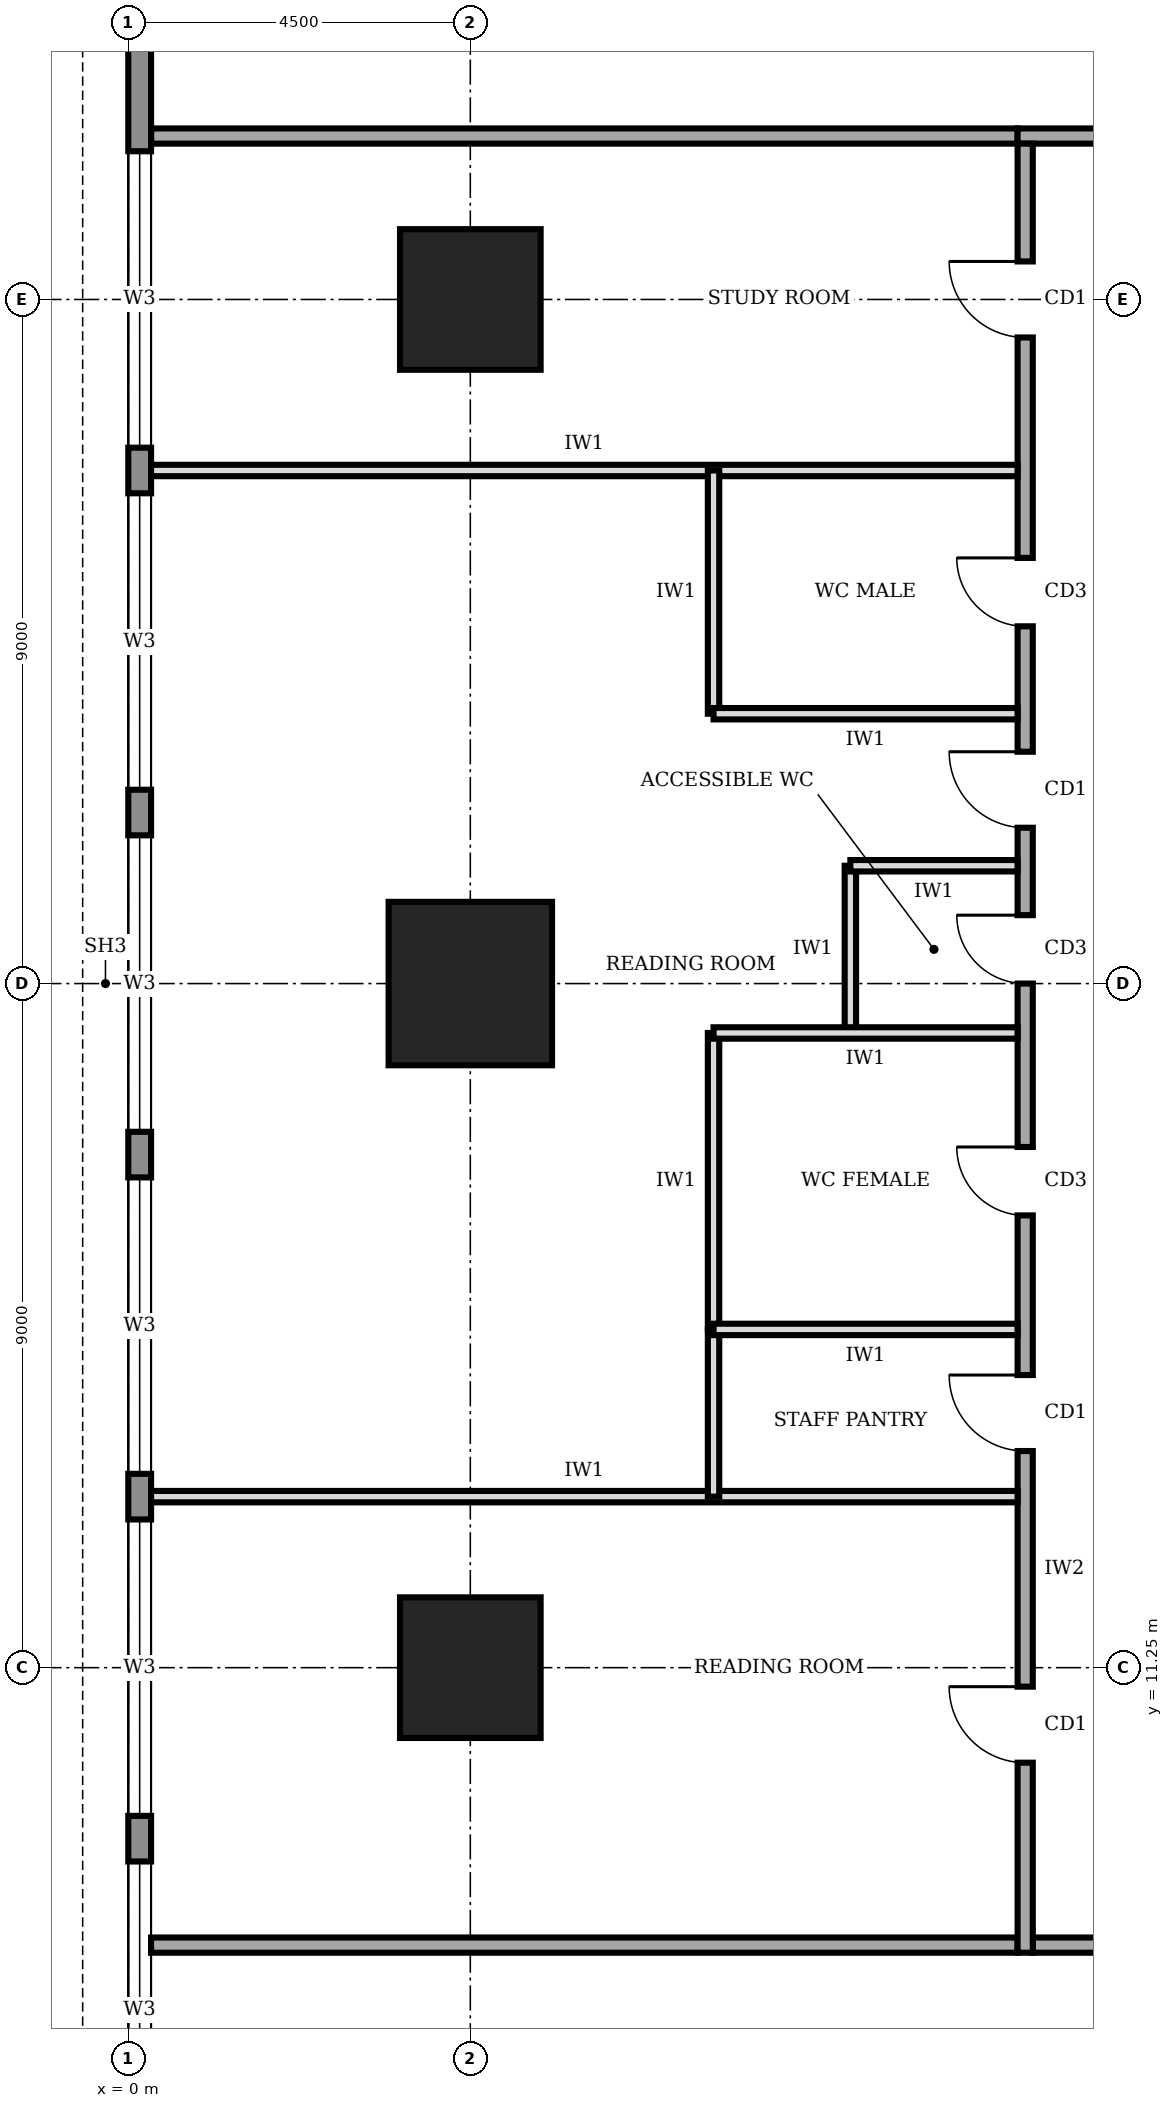
"""IFC4 building model, lengths in metres.
Left out: names, types, materials, properties, quantities, classifications, styles, units other than length and angle.
Written with IfcOpenShell. Run it as: python <this file> out.ifc"""

import sys

from ifc_helpers import new_model, si_unit, direction, frame, frame_2d, origin, origin_2d, place, context, subcontext, project, spatial, rectangle, extrude, element, fill, save


model = new_model("IFC4")
c1 = context("Model", 3, precision=1e-05, world=origin(), true_north=direction((0.0, 1.0)))
c2 = subcontext(c1, "Body", "Model", "MODEL_VIEW")
j1 = project(units=[si_unit("LENGTHUNIT", "METRE"), si_unit("PLANEANGLEUNIT", "RADIAN")], contexts=[c1])
p1 = place(None, origin())
s1 = spatial("IfcSite", under=j1, at=p1, CompositionType="ELEMENT")
p2 = place(p1, origin())
s2 = spatial("IfcBuilding", under=s1, at=p2, CompositionType="ELEMENT")
p3 = place(p2, frame((0.0, 0.0, 265.0)))
s3 = spatial("IfcBuildingStorey", under=s2, at=p3, CompositionType="ELEMENT", Elevation=265.0)
p4 = place(p3, frame((4.5, 11.25, 0.0), z_axis=(0.0, 0.0, 1.0), x_axis=(1.0, 0.0, 0.0)))
e1 = element("IfcColumn", 1, at=p4, inside=s3, PredefinedType="COLUMN", context=c2, shape_type="SweptSolid", body=[
    extrude(rectangle(XDim=1.85, YDim=1.85, at=origin_2d()), origin(), (0.0, 0.0, 1.0), 4.0),
])
p5 = place(p3, frame((4.5, 20.25, 0.0), z_axis=(0.0, 0.0, 1.0), x_axis=(1.0, 0.0, 0.0)))
e2 = element("IfcColumn", 2, at=p5, inside=s3, PredefinedType="COLUMN", context=c2, shape_type="SweptSolid", body=[
    extrude(rectangle(XDim=2.15, YDim=2.15, at=origin_2d()), origin(), (0.0, 0.0, 1.0), 4.0),
])
p6 = place(p3, frame((4.5, 29.25, 0.0), z_axis=(0.0, 0.0, 1.0), x_axis=(1.0, 0.0, 0.0)))
e3 = element("IfcColumn", 3, at=p6, inside=s3, PredefinedType="COLUMN", context=c2, shape_type="SweptSolid", body=[
    extrude(rectangle(XDim=1.85, YDim=1.85, at=origin_2d()), origin(), (0.0, 0.0, 1.0), 4.0),
])
p7 = place(p3, frame((0.15, 35.98, 0.0), z_axis=(0.0, 0.0, 1.0), x_axis=(0.0, -1.0, 0.0)))
e4 = element("IfcWall", 4, at=p7, inside=s3, PredefinedType="STANDARD", context=c2, shape_type="SweptSolid", body=[
    extrude(rectangle(XDim=31.46, YDim=0.3, at=frame_2d((15.73, 0.0))), origin(), (0.0, 0.0, 1.0), 3.75),
])
p8 = place(p7, frame((27.28, 0.0, 0.95)))
e5 = element("IfcOpeningElement", 5, at=p8, cuts=e4, PredefinedType="OPENING", context=c2, shape_type="SweptSolid", body=[
    extrude(rectangle(XDim=3.9, YDim=1.8, at=frame_2d((1.95, 0.9))), frame((0.0, 0.16, 0.0), z_axis=(0.0, -1.0, 0.0), x_axis=(1.0, 0.0, 0.0)), (0.0, 0.0, 1.0), 0.32),
])
p9 = place(p7, frame((22.78, 0.0, 0.95)))
e6 = element("IfcOpeningElement", 6, at=p9, cuts=e4, PredefinedType="OPENING", context=c2, shape_type="SweptSolid", body=[
    extrude(rectangle(XDim=3.9, YDim=1.8, at=frame_2d((1.95, 0.9))), frame((0.0, 0.16, 0.0), z_axis=(0.0, -1.0, 0.0), x_axis=(1.0, 0.0, 0.0)), (0.0, 0.0, 1.0), 0.32),
])
p10 = place(p7, frame((18.28, 0.0, 0.95)))
e7 = element("IfcOpeningElement", 7, at=p10, cuts=e4, PredefinedType="OPENING", context=c2, shape_type="SweptSolid", body=[
    extrude(rectangle(XDim=3.9, YDim=1.8, at=frame_2d((1.95, 0.9))), frame((0.0, 0.16, 0.0), z_axis=(0.0, -1.0, 0.0), x_axis=(1.0, 0.0, 0.0)), (0.0, 0.0, 1.0), 0.32),
])
p11 = place(p7, frame((13.78, 0.0, 0.95)))
e8 = element("IfcOpeningElement", 8, at=p11, cuts=e4, PredefinedType="OPENING", context=c2, shape_type="SweptSolid", body=[
    extrude(rectangle(XDim=3.9, YDim=1.8, at=frame_2d((1.95, 0.9))), frame((0.0, 0.16, 0.0), z_axis=(0.0, -1.0, 0.0), x_axis=(1.0, 0.0, 0.0)), (0.0, 0.0, 1.0), 0.32),
])
p12 = place(p7, frame((9.28, 0.0, 0.95)))
e9 = element("IfcOpeningElement", 9, at=p12, cuts=e4, PredefinedType="OPENING", context=c2, shape_type="SweptSolid", body=[
    extrude(rectangle(XDim=3.9, YDim=1.8, at=frame_2d((1.95, 0.9))), frame((0.0, 0.16, 0.0), z_axis=(0.0, -1.0, 0.0), x_axis=(1.0, 0.0, 0.0)), (0.0, 0.0, 1.0), 0.32),
])
p13 = place(p7, frame((4.78, 0.0, 0.95)))
e10 = element("IfcOpeningElement", 10, at=p13, cuts=e4, PredefinedType="OPENING", context=c2, shape_type="SweptSolid", body=[
    extrude(rectangle(XDim=3.9, YDim=1.8, at=frame_2d((1.95, 0.9))), frame((0.0, 0.16, 0.0), z_axis=(0.0, -1.0, 0.0), x_axis=(1.0, 0.0, 0.0)), (0.0, 0.0, 1.0), 0.32),
])
p14 = place(p3, frame((11.9, 7.6, 0.0), z_axis=(0.0, 0.0, 1.0), x_axis=(1.0, 0.0, 0.0)))
e11 = element("IfcWall", 11, at=p14, inside=s3, PredefinedType="SOLIDWALL", context=c2, shape_type="SweptSolid", body=[
    extrude(rectangle(XDim=16.9, YDim=0.2, at=frame_2d((8.45, 0.0))), origin(), (0.0, 0.0, 1.0), 3.75),
])
p15 = place(p14, frame((4.5, 0.0, 0.0)))
e12 = element("IfcOpeningElement", 12, at=p15, cuts=e11, PredefinedType="OPENING", context=c2, shape_type="SweptSolid", body=[
    extrude(rectangle(XDim=1.4, YDim=2.1, at=frame_2d((0.7, 1.05))), frame((0.0, 0.11, 0.0), z_axis=(0.0, -1.0, 0.0), x_axis=(1.0, 0.0, 0.0)), (0.0, 0.0, 1.0), 0.22),
])
p16 = place(p14, frame((12.85, 0.0, 0.0)))
e13 = element("IfcOpeningElement", 13, at=p16, cuts=e11, PredefinedType="OPENING", context=c2, shape_type="SweptSolid", body=[
    extrude(rectangle(XDim=1.8, YDim=2.1, at=frame_2d((0.9, 1.05))), frame((0.0, 0.11, 0.0), z_axis=(0.0, -1.0, 0.0), x_axis=(1.0, 0.0, 0.0)), (0.0, 0.0, 1.0), 0.22),
])
p17 = place(p3, frame((28.6, 31.4, 0.0), z_axis=(0.0, 0.0, 1.0), x_axis=(-1.0, 0.0, 0.0)))
e14 = element("IfcWall", 14, at=p17, inside=s3, PredefinedType="SOLIDWALL", context=c2, shape_type="SweptSolid", body=[
    extrude(rectangle(XDim=16.9, YDim=0.2, at=frame_2d((8.45, 0.0))), origin(), (0.0, 0.0, 1.0), 3.75),
])
p18 = place(p17, frame((13.05, 0.0, 0.0)))
e15 = element("IfcOpeningElement", 15, at=p18, cuts=e14, PredefinedType="OPENING", context=c2, shape_type="SweptSolid", body=[
    extrude(rectangle(XDim=1.4, YDim=2.1, at=frame_2d((0.7, 1.05))), frame((0.0, 0.11, 0.0), z_axis=(0.0, -1.0, 0.0), x_axis=(1.0, 0.0, 0.0)), (0.0, 0.0, 1.0), 0.22),
])
p19 = place(p17, frame((5.6, 0.0, 0.0)))
e16 = element("IfcOpeningElement", 16, at=p19, cuts=e14, PredefinedType="OPENING", context=c2, shape_type="SweptSolid", body=[
    extrude(rectangle(XDim=1.0, YDim=2.1, at=frame_2d((0.5, 1.05))), frame((0.0, 0.11, 0.0), z_axis=(0.0, -1.0, 0.0), x_axis=(1.0, 0.0, 0.0)), (0.0, 0.0, 1.0), 0.22),
])
p20 = place(p17, frame((0.275, 0.0, 0.0)))
e17 = element("IfcOpeningElement", 17, at=p20, cuts=e14, PredefinedType="OPENING", context=c2, shape_type="SweptSolid", body=[
    extrude(rectangle(XDim=1.0, YDim=2.1, at=frame_2d((0.5, 1.05))), frame((0.0, 0.11, 0.0), z_axis=(0.0, -1.0, 0.0), x_axis=(1.0, 0.0, 0.0)), (0.0, 0.0, 1.0), 0.22),
])
p21 = place(p3, frame((11.8, 31.3, 0.0), z_axis=(0.0, 0.0, 1.0), x_axis=(0.0, -1.0, 0.0)))
e18 = element("IfcWall", 18, at=p21, inside=s3, PredefinedType="SOLIDWALL", context=c2, shape_type="SweptSolid", body=[
    extrude(rectangle(XDim=23.8, YDim=0.2, at=frame_2d((11.9, 0.0))), origin(), (0.0, 0.0, 1.0), 3.75),
])
p22 = place(p21, frame((20.3, 0.0, 0.0)))
e19 = element("IfcOpeningElement", 19, at=p22, cuts=e18, PredefinedType="OPENING", context=c2, shape_type="SweptSolid", body=[
    extrude(rectangle(XDim=1.0, YDim=2.1, at=frame_2d((0.5, 1.05))), frame((0.0, 0.11, 0.0), z_axis=(0.0, -1.0, 0.0), x_axis=(1.0, 0.0, 0.0)), (0.0, 0.0, 1.0), 0.22),
])
p23 = place(p21, frame((16.2, 0.0, 0.0)))
e20 = element("IfcOpeningElement", 20, at=p23, cuts=e18, PredefinedType="OPENING", context=c2, shape_type="SweptSolid", body=[
    extrude(rectangle(XDim=1.0, YDim=2.1, at=frame_2d((0.5, 1.05))), frame((0.0, 0.11, 0.0), z_axis=(0.0, -1.0, 0.0), x_axis=(1.0, 0.0, 0.0)), (0.0, 0.0, 1.0), 0.22),
])
p24 = place(p21, frame((13.2, 0.0, 0.0)))
e21 = element("IfcOpeningElement", 21, at=p24, cuts=e18, PredefinedType="OPENING", context=c2, shape_type="SweptSolid", body=[
    extrude(rectangle(XDim=0.9, YDim=2.1, at=frame_2d((0.45, 1.05))), frame((0.0, 0.11, 0.0), z_axis=(0.0, -1.0, 0.0), x_axis=(1.0, 0.0, 0.0)), (0.0, 0.0, 1.0), 0.22),
])
p25 = place(p21, frame((10.15, 0.0, 0.0)))
e22 = element("IfcOpeningElement", 22, at=p25, cuts=e18, PredefinedType="OPENING", context=c2, shape_type="SweptSolid", body=[
    extrude(rectangle(XDim=0.9, YDim=2.1, at=frame_2d((0.45, 1.05))), frame((0.0, 0.11, 0.0), z_axis=(0.0, -1.0, 0.0), x_axis=(1.0, 0.0, 0.0)), (0.0, 0.0, 1.0), 0.22),
])
p26 = place(p21, frame((5.45, 0.0, 0.0)))
e23 = element("IfcOpeningElement", 23, at=p26, cuts=e18, PredefinedType="OPENING", context=c2, shape_type="SweptSolid", body=[
    extrude(rectangle(XDim=0.9, YDim=2.1, at=frame_2d((0.45, 1.05))), frame((0.0, 0.11, 0.0), z_axis=(0.0, -1.0, 0.0), x_axis=(1.0, 0.0, 0.0)), (0.0, 0.0, 1.0), 0.22),
])
p27 = place(p21, frame((8.0, 0.0, 0.0)))
e24 = element("IfcOpeningElement", 24, at=p27, cuts=e18, PredefinedType="OPENING", context=c2, shape_type="SweptSolid", body=[
    extrude(rectangle(XDim=1.0, YDim=2.1, at=frame_2d((0.5, 1.05))), frame((0.0, 0.11, 0.0), z_axis=(0.0, -1.0, 0.0), x_axis=(1.0, 0.0, 0.0)), (0.0, 0.0, 1.0), 0.22),
])
p28 = place(p21, frame((1.55, 0.0, 0.0)))
e25 = element("IfcOpeningElement", 25, at=p28, cuts=e18, PredefinedType="OPENING", context=c2, shape_type="SweptSolid", body=[
    extrude(rectangle(XDim=1.0, YDim=2.1, at=frame_2d((0.5, 1.05))), frame((0.0, 0.11, 0.0), z_axis=(0.0, -1.0, 0.0), x_axis=(1.0, 0.0, 0.0)), (0.0, 0.0, 1.0), 0.22),
])
for number, where, z_axis, x_axis in (
    (26, (0.3, 7.6, 0.0), (0.0, 0.0, 1.0), (1.0, 0.0, 0.0)),
    (27, (0.3, 31.4, 0.0), (0.0, 0.0, 1.0), (1.0, 0.0, 0.0)),
):
    element("IfcWall", number, at=place(p3, frame(where, z_axis=z_axis, x_axis=x_axis)), inside=s3, PredefinedType="SOLIDWALL", context=c2, shape_type="SweptSolid", body=[
        extrude(rectangle(XDim=11.4, YDim=0.2, at=frame_2d((5.7, 0.0))), origin(), (0.0, 0.0, 1.0), 3.75),
    ])
for number, where, z_axis, x_axis in (
    (28, (0.3, 13.5, 0.0), (0.0, 0.0, 1.0), (1.0, 0.0, 0.0)),
    (29, (0.3, 27.0, 0.0), (0.0, 0.0, 1.0), (1.0, 0.0, 0.0)),
):
    element("IfcWall", number, at=place(p3, frame(where, z_axis=z_axis, x_axis=x_axis)), inside=s3, PredefinedType="PARTITIONING", context=c2, shape_type="SweptSolid", body=[
        extrude(rectangle(XDim=11.4, YDim=0.15, at=frame_2d((5.7, 0.0))), origin(), (0.0, 0.0, 1.0), 3.75),
    ])
p29 = place(p3, frame((11.7, 15.7, 0.0), z_axis=(0.0, 0.0, 1.0), x_axis=(-1.0, 0.0, 0.0)))
e30 = element("IfcWall", 30, at=p29, inside=s3, PredefinedType="PARTITIONING", context=c2, shape_type="SweptSolid", body=[
    extrude(rectangle(XDim=4.0, YDim=0.15, at=frame_2d((2.0, 0.0))), origin(), (0.0, 0.0, 1.0), 3.75),
])
p30 = place(p3, frame((11.7, 19.6, 0.0), z_axis=(0.0, 0.0, 1.0), x_axis=(-1.0, 0.0, 0.0)))
e31 = element("IfcWall", 31, at=p30, inside=s3, PredefinedType="PARTITIONING", context=c2, shape_type="SweptSolid", body=[
    extrude(rectangle(XDim=4.0, YDim=0.15, at=frame_2d((2.0, 0.0))), origin(), (0.0, 0.0, 1.0), 2.85),
])
p31 = place(p3, frame((11.7, 21.8, 0.0), z_axis=(0.0, 0.0, 1.0), x_axis=(-1.0, 0.0, 0.0)))
e32 = element("IfcWall", 32, at=p31, inside=s3, PredefinedType="PARTITIONING", context=c2, shape_type="SweptSolid", body=[
    extrude(rectangle(XDim=2.2, YDim=0.15, at=frame_2d((1.1, 0.0))), origin(), (0.0, 0.0, 1.0), 3.75),
])
p32 = place(p3, frame((11.7, 23.8, 0.0), z_axis=(0.0, 0.0, 1.0), x_axis=(-1.0, 0.0, 0.0)))
e33 = element("IfcWall", 33, at=p32, inside=s3, PredefinedType="PARTITIONING", context=c2, shape_type="SweptSolid", body=[
    extrude(rectangle(XDim=4.0, YDim=0.15, at=frame_2d((2.0, 0.0))), origin(), (0.0, 0.0, 1.0), 3.75),
])
p33 = place(p3, frame((7.7, 13.5, 0.0), z_axis=(0.0, 0.0, 1.0), x_axis=(0.0, 1.0, 0.0)))
e34 = element("IfcWall", 34, at=p33, inside=s3, PredefinedType="PARTITIONING", context=c2, shape_type="SweptSolid", body=[
    extrude(rectangle(XDim=2.2, YDim=0.15, at=frame_2d((1.1, 0.0))), origin(), (0.0, 0.0, 1.0), 3.75),
])
p34 = place(p3, frame((7.7, 15.7, 0.0), z_axis=(0.0, 0.0, 1.0), x_axis=(0.0, 1.0, 0.0)))
e35 = element("IfcWall", 35, at=p34, inside=s3, PredefinedType="PARTITIONING", context=c2, shape_type="SweptSolid", body=[
    extrude(rectangle(XDim=3.9, YDim=0.15, at=frame_2d((1.95, 0.0))), origin(), (0.0, 0.0, 1.0), 3.75),
])
p35 = place(p3, frame((9.5, 19.6, 0.0), z_axis=(0.0, 0.0, 1.0), x_axis=(0.0, 1.0, 0.0)))
e36 = element("IfcWall", 36, at=p35, inside=s3, PredefinedType="PARTITIONING", context=c2, shape_type="SweptSolid", body=[
    extrude(rectangle(XDim=2.2, YDim=0.15, at=frame_2d((1.1, 0.0))), origin(), (0.0, 0.0, 1.0), 3.75),
])
p36 = place(p3, frame((7.7, 23.8, 0.0), z_axis=(0.0, 0.0, 1.0), x_axis=(0.0, 1.0, 0.0)))
e37 = element("IfcWall", 37, at=p36, inside=s3, PredefinedType="PARTITIONING", context=c2, shape_type="SweptSolid", body=[
    extrude(rectangle(XDim=3.2, YDim=0.15, at=frame_2d((1.6, 0.0))), origin(), (0.0, 0.0, 1.0), 3.75),
])
p37 = place(p8, origin())
e38 = element("IfcWindow", 38, at=p37, inside=s3, PartitioningType="SINGLE_PANEL", PredefinedType="WINDOW", context=c2, shape_type="SweptSolid", body=[
    extrude(rectangle(XDim=3.9, YDim=1.8, at=frame_2d((1.95, 0.9))), frame((0.0, 0.03, 0.0), z_axis=(0.0, -1.0, 0.0), x_axis=(1.0, 0.0, 0.0)), (0.0, 0.0, 1.0), 0.06),
])
fill(e5, e38)
p38 = place(p9, origin())
e39 = element("IfcWindow", 39, at=p38, inside=s3, PartitioningType="SINGLE_PANEL", PredefinedType="WINDOW", context=c2, shape_type="SweptSolid", body=[
    extrude(rectangle(XDim=3.9, YDim=1.8, at=frame_2d((1.95, 0.9))), frame((0.0, 0.03, 0.0), z_axis=(0.0, -1.0, 0.0), x_axis=(1.0, 0.0, 0.0)), (0.0, 0.0, 1.0), 0.06),
])
fill(e6, e39)
p39 = place(p10, origin())
e40 = element("IfcWindow", 40, at=p39, inside=s3, PartitioningType="SINGLE_PANEL", PredefinedType="WINDOW", context=c2, shape_type="SweptSolid", body=[
    extrude(rectangle(XDim=3.9, YDim=1.8, at=frame_2d((1.95, 0.9))), frame((0.0, 0.03, 0.0), z_axis=(0.0, -1.0, 0.0), x_axis=(1.0, 0.0, 0.0)), (0.0, 0.0, 1.0), 0.06),
])
fill(e7, e40)
p40 = place(p11, origin())
e41 = element("IfcWindow", 41, at=p40, inside=s3, PartitioningType="SINGLE_PANEL", PredefinedType="WINDOW", context=c2, shape_type="SweptSolid", body=[
    extrude(rectangle(XDim=3.9, YDim=1.8, at=frame_2d((1.95, 0.9))), frame((0.0, 0.03, 0.0), z_axis=(0.0, -1.0, 0.0), x_axis=(1.0, 0.0, 0.0)), (0.0, 0.0, 1.0), 0.06),
])
fill(e8, e41)
p41 = place(p12, origin())
e42 = element("IfcWindow", 42, at=p41, inside=s3, PartitioningType="SINGLE_PANEL", PredefinedType="WINDOW", context=c2, shape_type="SweptSolid", body=[
    extrude(rectangle(XDim=3.9, YDim=1.8, at=frame_2d((1.95, 0.9))), frame((0.0, 0.03, 0.0), z_axis=(0.0, -1.0, 0.0), x_axis=(1.0, 0.0, 0.0)), (0.0, 0.0, 1.0), 0.06),
])
fill(e9, e42)
p42 = place(p13, origin())
e43 = element("IfcWindow", 43, at=p42, inside=s3, PartitioningType="SINGLE_PANEL", PredefinedType="WINDOW", context=c2, shape_type="SweptSolid", body=[
    extrude(rectangle(XDim=3.9, YDim=1.8, at=frame_2d((1.95, 0.9))), frame((0.0, 0.03, 0.0), z_axis=(0.0, -1.0, 0.0), x_axis=(1.0, 0.0, 0.0)), (0.0, 0.0, 1.0), 0.06),
])
fill(e10, e43)
p43 = place(p22, frame((1.0, 0.0, 0.0), z_axis=(0.0, 0.0, 1.0), x_axis=(-1.0, 0.0, 0.0)))
e44 = element("IfcDoor", 44, at=p43, inside=s3, OperationType="SINGLE_SWING_RIGHT", PredefinedType="DOOR", context=c2, shape_type="SweptSolid", body=[
    extrude(rectangle(XDim=1.0, YDim=2.1, at=frame_2d((0.5, 1.05))), frame((0.0, 0.025, 0.0), z_axis=(0.0, -1.0, 0.0), x_axis=(1.0, 0.0, 0.0)), (0.0, 0.0, 1.0), 0.05),
])
fill(e19, e44)
p44 = place(p23, frame((1.0, 0.0, 0.0), z_axis=(0.0, 0.0, 1.0), x_axis=(-1.0, 0.0, 0.0)))
e45 = element("IfcDoor", 45, at=p44, inside=s3, OperationType="SINGLE_SWING_RIGHT", PredefinedType="DOOR", context=c2, shape_type="SweptSolid", body=[
    extrude(rectangle(XDim=1.0, YDim=2.1, at=frame_2d((0.5, 1.05))), frame((0.0, 0.025, 0.0), z_axis=(0.0, -1.0, 0.0), x_axis=(1.0, 0.0, 0.0)), (0.0, 0.0, 1.0), 0.05),
])
fill(e20, e45)
p45 = place(p24, frame((0.9, 0.0, 0.0), z_axis=(0.0, 0.0, 1.0), x_axis=(-1.0, 0.0, 0.0)))
e46 = element("IfcDoor", 46, at=p45, inside=s3, OperationType="SINGLE_SWING_RIGHT", PredefinedType="DOOR", context=c2, shape_type="SweptSolid", body=[
    extrude(rectangle(XDim=0.9, YDim=2.1, at=frame_2d((0.45, 1.05))), frame((0.0, 0.025, 0.0), z_axis=(0.0, -1.0, 0.0), x_axis=(1.0, 0.0, 0.0)), (0.0, 0.0, 1.0), 0.05),
])
fill(e21, e46)
p46 = place(p25, frame((0.9, 0.0, 0.0), z_axis=(0.0, 0.0, 1.0), x_axis=(-1.0, 0.0, 0.0)))
e47 = element("IfcDoor", 47, at=p46, inside=s3, OperationType="SINGLE_SWING_RIGHT", PredefinedType="DOOR", context=c2, shape_type="SweptSolid", body=[
    extrude(rectangle(XDim=0.9, YDim=2.1, at=frame_2d((0.45, 1.05))), frame((0.0, 0.025, 0.0), z_axis=(0.0, -1.0, 0.0), x_axis=(1.0, 0.0, 0.0)), (0.0, 0.0, 1.0), 0.05),
])
fill(e22, e47)
p47 = place(p26, frame((0.9, 0.0, 0.0), z_axis=(0.0, 0.0, 1.0), x_axis=(-1.0, 0.0, 0.0)))
e48 = element("IfcDoor", 48, at=p47, inside=s3, OperationType="SINGLE_SWING_RIGHT", PredefinedType="DOOR", context=c2, shape_type="SweptSolid", body=[
    extrude(rectangle(XDim=0.9, YDim=2.1, at=frame_2d((0.45, 1.05))), frame((0.0, 0.025, 0.0), z_axis=(0.0, -1.0, 0.0), x_axis=(1.0, 0.0, 0.0)), (0.0, 0.0, 1.0), 0.05),
])
fill(e23, e48)
p48 = place(p27, frame((1.0, 0.0, 0.0), z_axis=(0.0, 0.0, 1.0), x_axis=(-1.0, 0.0, 0.0)))
e49 = element("IfcDoor", 49, at=p48, inside=s3, OperationType="SINGLE_SWING_RIGHT", PredefinedType="DOOR", context=c2, shape_type="SweptSolid", body=[
    extrude(rectangle(XDim=1.0, YDim=2.1, at=frame_2d((0.5, 1.05))), frame((0.0, 0.025, 0.0), z_axis=(0.0, -1.0, 0.0), x_axis=(1.0, 0.0, 0.0)), (0.0, 0.0, 1.0), 0.05),
])
fill(e24, e49)
p49 = place(p28, frame((1.0, 0.0, 0.0), z_axis=(0.0, 0.0, 1.0), x_axis=(-1.0, 0.0, 0.0)))
e50 = element("IfcDoor", 50, at=p49, inside=s3, OperationType="SINGLE_SWING_RIGHT", PredefinedType="DOOR", context=c2, shape_type="SweptSolid", body=[
    extrude(rectangle(XDim=1.0, YDim=2.1, at=frame_2d((0.5, 1.05))), frame((0.0, 0.025, 0.0), z_axis=(0.0, -1.0, 0.0), x_axis=(1.0, 0.0, 0.0)), (0.0, 0.0, 1.0), 0.05),
])
fill(e25, e50)
save(model, sys.argv[1])
